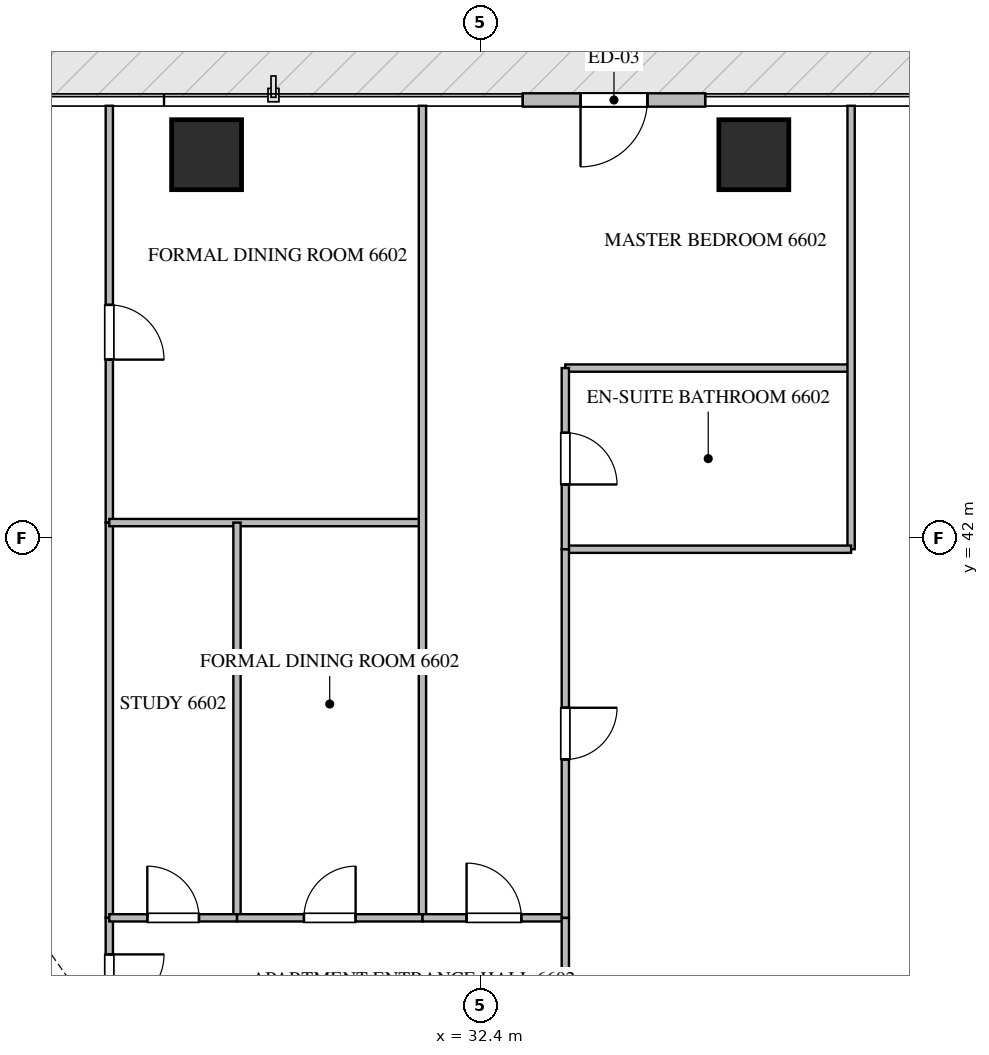
"""IFC4 building model, lengths in metres.
Left out: names, types, materials, properties, quantities, classifications, styles, units other than length and angle.
Written with IfcOpenShell. Run it as: python <this file> out.ifc"""

import sys

from ifc_helpers import new_model, si_unit, direction, frame, frame_2d, origin, origin_2d, place, context, subcontext, project, spatial, rectangle, extrude, source, transform, mapped, element, fill, save


model = new_model("IFC4")
c1 = context("Model", 3, precision=1e-05, world=origin(), true_north=direction((0.0, 1.0)))
c2 = subcontext(c1, "Body", "Model", "MODEL_VIEW")
j1 = project(units=[si_unit("LENGTHUNIT", "METRE"), si_unit("PLANEANGLEUNIT", "RADIAN")], contexts=[c1])
p1 = place(None, origin())
s1 = spatial("IfcSite", under=j1, at=p1, CompositionType="ELEMENT")
p2 = place(p1, origin())
s2 = spatial("IfcBuilding", under=s1, at=p2, CompositionType="ELEMENT")
p3 = place(p2, frame((0.0, 0.0, 264.35)))
s3 = spatial("IfcBuildingStorey", under=s2, at=p3, CompositionType="ELEMENT", Elevation=264.35)
m1 = source(origin(), c2, "Body", "SweptSolid", [
    extrude(rectangle(XDim=1.15, YDim=1.15, at=origin_2d()), origin(), (0.0, 0.0, 1.0), 3.85),
])
for number, where, z_axis, x_axis in (
    (1, (27.9, 48.3, -0.26), (0.0, 0.0, 1.0), (1.0, 0.0, 0.0)),
    (2, (36.9, 48.3, -0.26), (0.0, 0.0, 1.0), (1.0, 0.0, 0.0)),
):
    element("IfcColumn", number, at=place(p3, frame(where, z_axis=z_axis, x_axis=x_axis)), inside=s3, PredefinedType="COLUMN", context=c2, shape_type="MappedRepresentation", body=[
        mapped(m1, transform((0.0, 0.0, 0.0), scale=1.0)),
    ])
p4 = place(p3, frame((36.1, 49.2, 0.0), z_axis=(0.0, 0.0, 1.0), x_axis=(-1.0, 0.0, 0.0)))
e3 = element("IfcWall", 3, at=p4, inside=s3, PredefinedType="ELEMENTEDWALL", context=c2, shape_type="SweptSolid", body=[
    extrude(rectangle(XDim=3.0, YDim=0.22, at=frame_2d((1.5, 0.0))), origin(), (0.0, 0.0, 1.0), 3.575),
])
p5 = place(p4, frame((0.95, 0.0, 0.0)))
e4 = element("IfcOpeningElement", 4, at=p5, cuts=e3, PredefinedType="OPENING", context=c2, shape_type="SweptSolid", body=[
    extrude(rectangle(XDim=1.1, YDim=2.2, at=frame_2d((0.55, 1.1))), frame((0.0, 0.12, 0.0), z_axis=(0.0, -1.0, 0.0), x_axis=(1.0, 0.0, 0.0)), (0.0, 0.0, 1.0), 0.24),
])
p6 = place(p3, frame((26.3, 35.75, 0.0), z_axis=(0.0, 0.0, 1.0), x_axis=(0.0, -1.0, 0.0)))
e5 = element("IfcWall", 5, at=p6, inside=s3, PredefinedType="PARTITIONING", context=c2, shape_type="SweptSolid", body=[
    extrude(rectangle(XDim=1.975, YDim=0.12, at=frame_2d((0.988, 0.0))), origin(), (0.0, 0.0, 1.0), 3.59),
])
p7 = place(p6, frame((0.601, 0.0, 0.0)))
e6 = element("IfcOpeningElement", 6, at=p7, cuts=e5, PredefinedType="OPENING", context=c2, shape_type="SweptSolid", body=[
    extrude(rectangle(XDim=0.9, YDim=2.1, at=frame_2d((0.45, 1.05))), frame((0.0, 0.07, 0.0), z_axis=(0.0, -1.0, 0.0), x_axis=(1.0, 0.0, 0.0)), (0.0, 0.0, 1.0), 0.14),
])
p8 = place(p3, frame((26.3, 49.105, 0.0), z_axis=(0.0, 0.0, 1.0), x_axis=(0.0, -1.0, 0.0)))
e7 = element("IfcWall", 7, at=p8, inside=s3, PredefinedType="PARTITIONING", context=c2, shape_type="SweptSolid", body=[
    extrude(rectangle(XDim=6.855, YDim=0.12, at=frame_2d((3.427, 0.0))), origin(), (0.0, 0.0, 1.0), 3.59),
])
p9 = place(p8, frame((3.275, 0.0, 0.0)))
e8 = element("IfcOpeningElement", 8, at=p9, cuts=e7, PredefinedType="OPENING", context=c2, shape_type="SweptSolid", body=[
    extrude(rectangle(XDim=0.9, YDim=2.1, at=frame_2d((0.45, 1.05))), frame((0.0, 0.07, 0.0), z_axis=(0.0, -1.0, 0.0), x_axis=(1.0, 0.0, 0.0)), (0.0, 0.0, 1.0), 0.14),
])
p10 = place(p3, frame((26.3, 42.248, 0.0), z_axis=(0.0, 0.0, 1.0), x_axis=(0.0, -1.0, 0.0)))
e9 = element("IfcWall", 9, at=p10, inside=s3, PredefinedType="PARTITIONING", context=c2, shape_type="SweptSolid", body=[
    extrude(rectangle(XDim=6.496, YDim=0.12, at=frame_2d((3.248, 0.0))), origin(), (0.0, 0.0, 1.0), 3.59),
])
p11 = place(p3, frame((26.3, 42.25, 0.0), z_axis=(0.0, 0.0, 1.0), x_axis=(1.0, 0.0, 0.0)))
e10 = element("IfcWall", 10, at=p11, inside=s3, PredefinedType="PARTITIONING", context=c2, shape_type="SweptSolid", body=[
    extrude(rectangle(XDim=5.15, YDim=0.12, at=frame_2d((2.575, 0.0))), origin(), (0.0, 0.0, 1.0), 3.59),
])
p12 = place(p3, frame((31.45, 49.105, 0.0), z_axis=(0.0, 0.0, 1.0), x_axis=(0.0, -1.0, 0.0)))
e11 = element("IfcWall", 11, at=p12, inside=s3, PredefinedType="PARTITIONING", context=c2, shape_type="SweptSolid", body=[
    extrude(rectangle(XDim=13.355, YDim=0.12, at=frame_2d((6.677, 0.0))), origin(), (0.0, 0.0, 1.0), 3.59),
])
p13 = place(p3, frame((28.4, 42.25, 0.0), z_axis=(0.0, 0.0, 1.0), x_axis=(0.0, -1.0, 0.0)))
e12 = element("IfcWall", 12, at=p13, inside=s3, PredefinedType="PARTITIONING", context=c2, shape_type="SweptSolid", body=[
    extrude(rectangle(XDim=6.5, YDim=0.12, at=frame_2d((3.25, 0.0))), origin(), (0.0, 0.0, 1.0), 3.59),
])
p14 = place(p3, frame((26.3, 35.75, 0.0), z_axis=(0.0, 0.0, 1.0), x_axis=(1.0, 0.0, 0.0)))
e13 = element("IfcWall", 13, at=p14, inside=s3, PredefinedType="PARTITIONING", context=c2, shape_type="SweptSolid", body=[
    extrude(rectangle(XDim=2.1, YDim=0.12, at=frame_2d((1.05, 0.0))), origin(), (0.0, 0.0, 1.0), 3.59),
])
p15 = place(p14, frame((0.625, 0.0, 0.0)))
e14 = element("IfcOpeningElement", 14, at=p15, cuts=e13, PredefinedType="OPENING", context=c2, shape_type="SweptSolid", body=[
    extrude(rectangle(XDim=0.85, YDim=2.1, at=frame_2d((0.425, 1.05))), frame((0.0, 0.07, 0.0), z_axis=(0.0, -1.0, 0.0), x_axis=(1.0, 0.0, 0.0)), (0.0, 0.0, 1.0), 0.14),
])
p16 = place(p3, frame((28.402, 35.75, 0.0), z_axis=(0.0, 0.0, 1.0), x_axis=(1.0, 0.0, 0.0)))
e15 = element("IfcWall", 15, at=p16, inside=s3, PredefinedType="PARTITIONING", context=c2, shape_type="SweptSolid", body=[
    extrude(rectangle(XDim=3.048, YDim=0.12, at=frame_2d((1.524, 0.0))), origin(), (0.0, 0.0, 1.0), 3.59),
])
p17 = place(p16, frame((1.099, 0.0, 0.0)))
e16 = element("IfcOpeningElement", 16, at=p17, cuts=e15, PredefinedType="OPENING", context=c2, shape_type="SweptSolid", body=[
    extrude(rectangle(XDim=0.85, YDim=2.1, at=frame_2d((0.425, 1.05))), frame((0.0, 0.07, 0.0), z_axis=(0.0, -1.0, 0.0), x_axis=(1.0, 0.0, 0.0)), (0.0, 0.0, 1.0), 0.14),
])
p18 = place(p3, frame((31.452, 35.75, 0.0), z_axis=(0.0, 0.0, 1.0), x_axis=(1.0, 0.0, 0.0)))
e17 = element("IfcWall", 17, at=p18, inside=s3, PredefinedType="PARTITIONING", context=c2, shape_type="SweptSolid", body=[
    extrude(rectangle(XDim=2.348, YDim=0.12, at=frame_2d((1.174, 0.0))), origin(), (0.0, 0.0, 1.0), 3.59),
])
p19 = place(p18, frame((0.724, 0.0, 0.0)))
e18 = element("IfcOpeningElement", 18, at=p19, cuts=e17, PredefinedType="OPENING", context=c2, shape_type="SweptSolid", body=[
    extrude(rectangle(XDim=0.9, YDim=2.1, at=frame_2d((0.45, 1.05))), frame((0.0, 0.07, 0.0), z_axis=(0.0, -1.0, 0.0), x_axis=(1.0, 0.0, 0.0)), (0.0, 0.0, 1.0), 0.14),
])
p20 = place(p3, frame((33.8, 44.791, 0.0), z_axis=(0.0, 0.0, 1.0), x_axis=(1.0, 0.0, 0.0)))
e19 = element("IfcWall", 19, at=p20, inside=s3, PredefinedType="PARTITIONING", context=c2, shape_type="SweptSolid", body=[
    extrude(rectangle(XDim=4.7, YDim=0.12, at=frame_2d((2.35, 0.0))), origin(), (0.0, 0.0, 1.0), 3.59),
])
p21 = place(p3, frame((38.5, 49.105, 0.0), z_axis=(0.0, 0.0, 1.0), x_axis=(0.0, -1.0, 0.0)))
e20 = element("IfcWall", 20, at=p21, inside=s3, PredefinedType="PARTITIONING", context=c2, shape_type="SweptSolid", body=[
    extrude(rectangle(XDim=7.293, YDim=0.12, at=frame_2d((3.646, 0.0))), origin(), (0.0, 0.0, 1.0), 3.59),
])
p22 = place(p3, frame((33.8, 41.812, 0.0), z_axis=(0.0, 0.0, 1.0), x_axis=(1.0, 0.0, 0.0)))
e21 = element("IfcWall", 21, at=p22, inside=s3, PredefinedType="PARTITIONING", context=c2, shape_type="SweptSolid", body=[
    extrude(rectangle(XDim=4.7, YDim=0.12, at=frame_2d((2.35, 0.0))), origin(), (0.0, 0.0, 1.0), 3.59),
])
p23 = place(p3, frame((33.8, 44.791, 0.0), z_axis=(0.0, 0.0, 1.0), x_axis=(0.0, -1.0, 0.0)))
e22 = element("IfcWall", 22, at=p23, inside=s3, PredefinedType="PARTITIONING", context=c2, shape_type="SweptSolid", body=[
    extrude(rectangle(XDim=2.979, YDim=0.12, at=frame_2d((1.49, 0.0))), origin(), (0.0, 0.0, 1.0), 3.59),
])
p24 = place(p23, frame((1.064, 0.0, 0.0)))
e23 = element("IfcOpeningElement", 23, at=p24, cuts=e22, PredefinedType="OPENING", context=c2, shape_type="SweptSolid", body=[
    extrude(rectangle(XDim=0.85, YDim=2.1, at=frame_2d((0.425, 1.05))), frame((0.0, 0.07, 0.0), z_axis=(0.0, -1.0, 0.0), x_axis=(1.0, 0.0, 0.0)), (0.0, 0.0, 1.0), 0.14),
])
p25 = place(p3, frame((33.8, 41.81, 0.0), z_axis=(0.0, 0.0, 1.0), x_axis=(0.0, -1.0, 0.0)))
e24 = element("IfcWall", 24, at=p25, inside=s3, PredefinedType="PARTITIONING", context=c2, shape_type="SweptSolid", body=[
    extrude(rectangle(XDim=6.06, YDim=0.12, at=frame_2d((3.03, 0.0))), origin(), (0.0, 0.0, 1.0), 3.59),
])
p26 = place(p25, frame((2.605, 0.0, 0.0)))
e25 = element("IfcOpeningElement", 25, at=p26, cuts=e24, PredefinedType="OPENING", context=c2, shape_type="SweptSolid", body=[
    extrude(rectangle(XDim=0.85, YDim=2.1, at=frame_2d((0.425, 1.05))), frame((0.0, 0.07, 0.0), z_axis=(0.0, -1.0, 0.0), x_axis=(1.0, 0.0, 0.0)), (0.0, 0.0, 1.0), 0.14),
])
p27 = place(p3, frame((33.8, 35.748, 0.0), z_axis=(0.0, 0.0, 1.0), x_axis=(0.0, -1.0, 0.0)))
e26 = element("IfcWall", 26, at=p27, inside=s3, PredefinedType="PARTITIONING", context=c2, shape_type="SweptSolid", body=[
    extrude(rectangle(XDim=1.973, YDim=0.12, at=frame_2d((0.987, 0.0))), origin(), (0.0, 0.0, 1.0), 3.59),
])
m2 = source(origin(), c2, "Body", "SweptSolid", [
    extrude(rectangle(XDim=1.1, YDim=2.2, at=frame_2d((0.55, 1.1))), frame((0.0, 0.025, 0.0), z_axis=(0.0, -1.0, 0.0), x_axis=(1.0, 0.0, 0.0)), (0.0, 0.0, 1.0), 0.05),
])
p28 = place(p5, origin())
e27 = element("IfcDoor", 27, at=p28, inside=s3, OperationType="SINGLE_SWING_RIGHT", PredefinedType="DOOR", context=c2, shape_type="MappedRepresentation", body=[
    mapped(m2, transform((0.0, 0.0, 0.0), scale=1.0)),
])
fill(e4, e27)
m3 = source(origin(), c2, "Body", "SweptSolid", [
    extrude(rectangle(XDim=0.9, YDim=2.1, at=frame_2d((0.45, 1.05))), frame((0.0, 0.025, 0.0), z_axis=(0.0, -1.0, 0.0), x_axis=(1.0, 0.0, 0.0)), (0.0, 0.0, 1.0), 0.05),
])
p29 = place(p7, origin())
e28 = element("IfcDoor", 28, at=p29, inside=s3, OperationType="SINGLE_SWING_LEFT", PredefinedType="DOOR", context=c2, shape_type="MappedRepresentation", body=[
    mapped(m3, transform((0.0, 0.0, 0.0), scale=1.0)),
])
fill(e6, e28)
p30 = place(p9, origin())
e29 = element("IfcDoor", 29, at=p30, inside=s3, OperationType="SINGLE_SWING_RIGHT", PredefinedType="DOOR", context=c2, shape_type="MappedRepresentation", body=[
    mapped(m3, transform((0.0, 0.0, 0.0), scale=1.0)),
])
fill(e8, e29)
m4 = source(origin(), c2, "Body", "SweptSolid", [
    extrude(rectangle(XDim=0.85, YDim=2.1, at=frame_2d((0.425, 1.05))), frame((0.0, 0.025, 0.0), z_axis=(0.0, -1.0, 0.0), x_axis=(1.0, 0.0, 0.0)), (0.0, 0.0, 1.0), 0.05),
])
p31 = place(p15, origin())
e30 = element("IfcDoor", 30, at=p31, inside=s3, OperationType="SINGLE_SWING_LEFT", PredefinedType="DOOR", context=c2, shape_type="MappedRepresentation", body=[
    mapped(m4, transform((0.0, 0.0, 0.0), scale=1.0)),
])
fill(e14, e30)
p32 = place(p17, origin())
e31 = element("IfcDoor", 31, at=p32, inside=s3, OperationType="SINGLE_SWING_RIGHT", PredefinedType="DOOR", context=c2, shape_type="MappedRepresentation", body=[
    mapped(m4, transform((0.0, 0.0, 0.0), scale=1.0)),
])
fill(e16, e31)
p33 = place(p19, origin())
e32 = element("IfcDoor", 32, at=p33, inside=s3, OperationType="SINGLE_SWING_LEFT", PredefinedType="DOOR", context=c2, shape_type="MappedRepresentation", body=[
    mapped(m3, transform((0.0, 0.0, 0.0), scale=1.0)),
])
fill(e18, e32)
p34 = place(p24, origin())
e33 = element("IfcDoor", 33, at=p34, inside=s3, OperationType="SINGLE_SWING_RIGHT", PredefinedType="DOOR", context=c2, shape_type="MappedRepresentation", body=[
    mapped(m4, transform((0.0, 0.0, 0.0), scale=1.0)),
])
fill(e23, e33)
p35 = place(p26, origin())
e34 = element("IfcDoor", 34, at=p35, inside=s3, OperationType="SINGLE_SWING_LEFT", PredefinedType="DOOR", context=c2, shape_type="MappedRepresentation", body=[
    mapped(m4, transform((0.0, 0.0, 0.0), scale=1.0)),
])
fill(e25, e34)
save(model, sys.argv[1])
